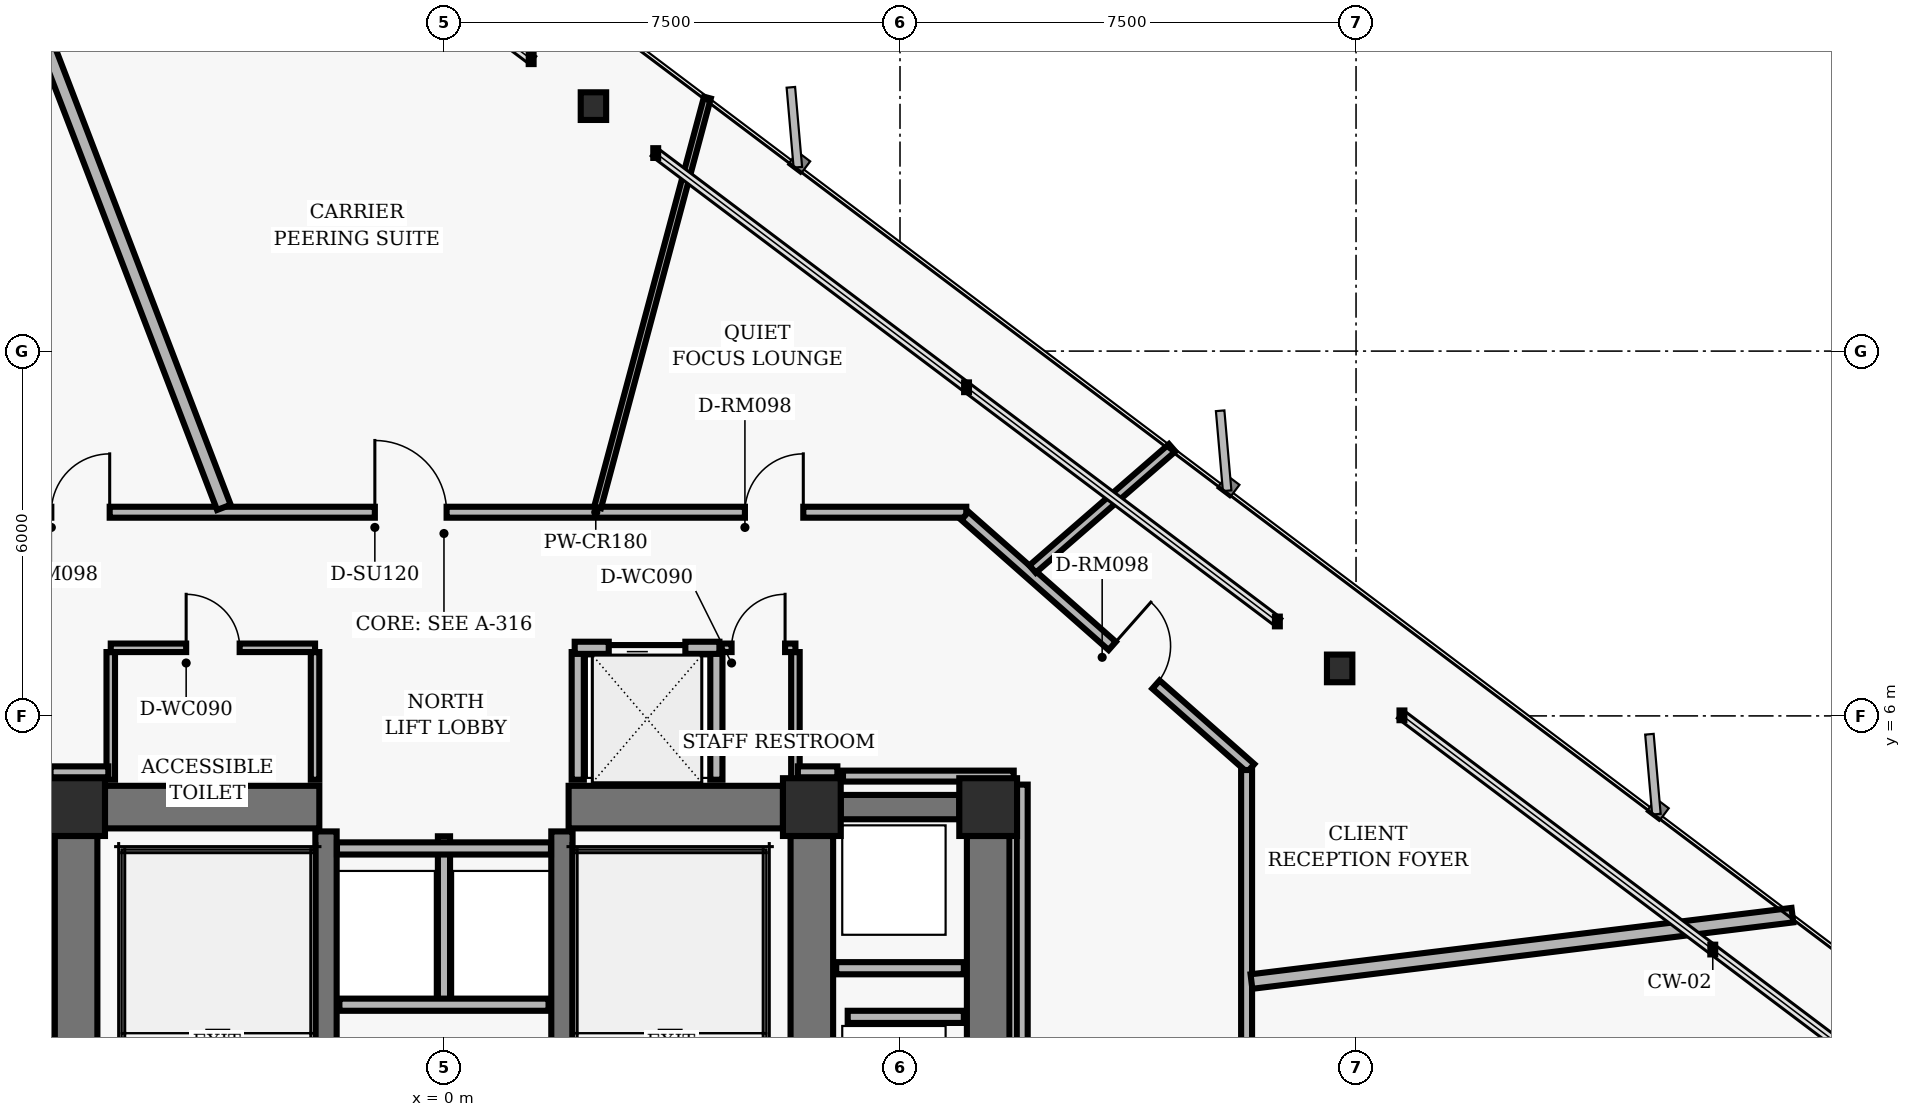
"""IFC4 building model, lengths in metres.
Left out: names, types, materials, properties, quantities, classifications, styles, units other than length and angle.
Written with IfcOpenShell. Run it as: python <this file> out.ifc"""

import sys

from ifc_helpers import new_model, si_unit, direction, frame, frame_2d, origin, origin_2d, place, context, subcontext, project, spatial, rectangle, hollow_rectangle, i_section, extrude, element, fill, save


model = new_model("IFC4")
c1 = context("Model", 3, precision=1e-05, world=origin(), true_north=direction((0.0, 1.0)))
c2 = subcontext(c1, "Body", "Model", "MODEL_VIEW")
j1 = project(units=[si_unit("LENGTHUNIT", "METRE"), si_unit("PLANEANGLEUNIT", "RADIAN")], contexts=[c1])
p1 = place(None, origin())
s1 = spatial("IfcSite", under=j1, at=p1, CompositionType="ELEMENT")
p2 = place(p1, origin())
s2 = spatial("IfcBuilding", under=s1, at=p2, CompositionType="ELEMENT")
p3 = place(p2, frame((0.0, 0.0, 66.4)))
s3 = spatial("IfcBuildingStorey", under=s2, at=p3, CompositionType="ELEMENT", Elevation=66.4)
for number, where, z_axis, x_axis in (
    (1, (-6.05, 4.5, 0.0), (0.0, 0.0, 1.0), (1.0, 0.0, 0.0)),
    (2, (6.05, 4.5, 0.0), (0.0, 0.0, 1.0), (1.0, 0.0, 0.0)),
    (3, (8.95, 4.5, 0.0), (0.0, 0.0, 1.0), (1.0, 0.0, 0.0)),
):
    element("IfcColumn", number, at=place(p3, frame(where, z_axis=z_axis, x_axis=x_axis)), inside=s3, PredefinedType="COLUMN", context=c2, shape_type="SweptSolid", body=[
        extrude(hollow_rectangle(XDim=0.95, YDim=0.95, WallThickness=0.06, InnerFilletRadius=0.02, OuterFilletRadius=0.04, at=origin_2d()), origin(), (0.0, 0.0, 1.0), 3.36),
    ])
for number, where, z_axis, x_axis in (
    (4, (-6.05, 0.475, 0.0), (0.0, 0.0, 1.0), (0.0, 1.0, 0.0)),
    (5, (6.05, 0.475, 0.0), (0.0, 0.0, 1.0), (0.0, 1.0, 0.0)),
):
    element("IfcWall", number, at=place(p3, frame(where, z_axis=z_axis, x_axis=x_axis)), inside=s3, PredefinedType="SHEAR", context=c2, shape_type="SweptSolid", body=[
        extrude(rectangle(XDim=3.55, YDim=0.7, at=frame_2d((1.775, 0.0))), origin(), (0.0, 0.0, 1.0), 3.098),
    ])
for number, where, z_axis, x_axis in (
    (6, (-1.94, -4.1, 0.0), (0.0, 0.0, 1.0), (0.0, 1.0, 0.0)),
    (7, (1.94, -4.1, 0.0), (0.0, 0.0, 1.0), (0.0, 1.0, 0.0)),
):
    element("IfcWall", number, at=place(p3, frame(where, z_axis=z_axis, x_axis=x_axis)), inside=s3, PredefinedType="SHEAR", context=c2, shape_type="SweptSolid", body=[
        extrude(rectangle(XDim=8.2, YDim=0.35, at=frame_2d((4.1, 0.0))), origin(), (0.0, 0.0, 1.0), 3.098),
    ])
for number, where, z_axis, x_axis in (
    (8, (-5.575, 4.5, 0.0), (0.0, 0.0, 1.0), (1.0, 0.0, 0.0)),
    (9, (2.05, 4.5, 0.0), (0.0, 0.0, 1.0), (1.0, 0.0, 0.0)),
):
    element("IfcWall", number, at=place(p3, frame(where, z_axis=z_axis, x_axis=x_axis)), inside=s3, PredefinedType="SHEAR", context=c2, shape_type="SweptSolid", body=[
        extrude(rectangle(XDim=3.525, YDim=0.7, at=frame_2d((1.762, 0.0))), origin(), (0.0, 0.0, 1.0), 3.098),
    ])
p4 = place(p3, frame((8.95, -3.825, 0.0), z_axis=(0.0, 0.0, 1.0), x_axis=(0.0, 1.0, 0.0)))
e10 = element("IfcWall", 10, at=p4, inside=s3, PredefinedType="SHEAR", context=c2, shape_type="SweptSolid", body=[
    extrude(rectangle(XDim=7.85, YDim=0.7, at=frame_2d((3.925, 0.0))), origin(), (0.0, 0.0, 1.0), 3.098),
])
p5 = place(p3, frame((6.525, 4.5, 0.0), z_axis=(0.0, 0.0, 1.0), x_axis=(1.0, 0.0, 0.0)))
e11 = element("IfcWall", 11, at=p5, inside=s3, PredefinedType="SHEAR", context=c2, shape_type="SweptSolid", body=[
    extrude(rectangle(XDim=1.95, YDim=0.4, at=frame_2d((0.975, 0.0))), origin(), (0.0, 0.0, 1.0), 3.098),
])
for number, where, z_axis, x_axis in (
    (12, (14.73, 6.781, 0.0), (0.0, 0.0, 1.0), (1.0, 0.0, 0.0)),
    (13, (2.458, 16.029, 0.0), (0.0, 0.0, 1.0), (1.0, 0.0, 0.0)),
):
    element("IfcColumn", number, at=place(p3, frame(where, z_axis=z_axis, x_axis=x_axis)), inside=s3, PredefinedType="COLUMN", context=c2, shape_type="SweptSolid", body=[
        extrude(i_section(OverallWidth=0.418, OverallDepth=0.455, WebThickness=0.042, FlangeThickness=0.068, FilletRadius=0.025, at=origin_2d()), origin(), (0.0, 0.0, 1.0), 3.36),
    ])
p6 = place(p3, frame((0.0, 1.25, 0.0), z_axis=(0.0, 0.0, 1.0), x_axis=(0.0, 1.0, 0.0)))
e14 = element("IfcWall", 14, at=p6, inside=s3, PredefinedType="PARTITIONING", context=c2, shape_type="SweptSolid", body=[
    extrude(rectangle(XDim=2.77, YDim=0.2, at=frame_2d((1.385, 0.0))), origin(), (0.0, 0.0, 1.0), 3.073),
])
p7 = place(p3, frame((-1.72, 1.25, 0.0), z_axis=(0.0, 0.0, 1.0), x_axis=(1.0, 0.0, 0.0)))
e15 = element("IfcWall", 15, at=p7, inside=s3, PredefinedType="PARTITIONING", context=c2, shape_type="SweptSolid", body=[
    extrude(rectangle(XDim=3.44, YDim=0.2, at=frame_2d((1.72, 0.0))), origin(), (0.0, 0.0, 1.0), 3.073),
])
p8 = place(p3, frame((-1.76, 3.82, 0.0), z_axis=(0.0, 0.0, 1.0), x_axis=(1.0, 0.0, 0.0)))
e16 = element("IfcWall", 16, at=p8, inside=s3, PredefinedType="PARTITIONING", context=c2, shape_type="SweptSolid", body=[
    extrude(rectangle(XDim=3.52, YDim=0.2, at=frame_2d((1.76, 0.0))), origin(), (0.0, 0.0, 1.0), 3.073),
])
for number, where, z_axis, x_axis in (
    (17, (2.2, 4.95, 0.0), (0.0, 0.0, 1.0), (0.0, 1.0, 0.0)),
    (18, (4.48, 4.95, 0.0), (0.0, 0.0, 1.0), (0.0, 1.0, 0.0)),
):
    element("IfcWall", number, at=place(p3, frame(where, z_axis=z_axis, x_axis=x_axis)), inside=s3, PredefinedType="PARTITIONING", context=c2, shape_type="SweptSolid", body=[
        extrude(rectangle(XDim=2.1, YDim=0.2, at=frame_2d((1.05, 0.0))), origin(), (0.0, 0.0, 1.0), 3.073),
    ])
p9 = place(p3, frame((2.15, 7.12, 0.0), z_axis=(0.0, 0.0, 1.0), x_axis=(1.0, 0.0, 0.0)))
e19 = element("IfcWall", 19, at=p9, inside=s3, PredefinedType="PARTITIONING", context=c2, shape_type="SweptSolid", body=[
    extrude(rectangle(XDim=2.38, YDim=0.2, at=frame_2d((1.19, 0.0))), origin(), (0.0, 0.0, 1.0), 2.587),
])
p10 = place(p9, frame((0.56, 0.0, 0.0)))
e20 = element("IfcOpeningElement", 20, at=p10, cuts=e19, PredefinedType="OPENING", context=c2, shape_type="SweptSolid", body=[
    extrude(rectangle(XDim=1.26, YDim=2.06, at=frame_2d((0.63, 1.03))), frame((0.0, 0.11, 0.0), z_axis=(0.0, -1.0, 0.0), x_axis=(1.0, 0.0, 0.0)), (0.0, 0.0, 1.0), 0.22),
])
for number, where, z_axis, x_axis in (
    (21, (-5.48, 4.95, 0.0), (0.0, 0.0, 1.0), (0.0, 1.0, 0.0)),
    (22, (-2.12, 4.95, 0.0), (0.0, 0.0, 1.0), (0.0, 1.0, 0.0)),
):
    element("IfcWall", number, at=place(p3, frame(where, z_axis=z_axis, x_axis=x_axis)), inside=s3, PredefinedType="PARTITIONING", context=c2, shape_type="SweptSolid", body=[
        extrude(rectangle(XDim=2.1, YDim=0.14, at=frame_2d((1.05, 0.0))), origin(), (0.0, 0.0, 1.0), 3.073),
    ])
p11 = place(p3, frame((-5.48, 7.12, 0.0), z_axis=(0.0, 0.0, 1.0), x_axis=(1.0, 0.0, 0.0)))
e23 = element("IfcWall", 23, at=p11, inside=s3, PredefinedType="PARTITIONING", context=c2, shape_type="SweptSolid", body=[
    extrude(rectangle(XDim=3.36, YDim=0.14, at=frame_2d((1.68, 0.0))), origin(), (0.0, 0.0, 1.0), 3.073),
])
p12 = place(p11, frame((1.24, 0.0, 0.0)))
e24 = element("IfcOpeningElement", 24, at=p12, cuts=e23, PredefinedType="OPENING", context=c2, shape_type="SweptSolid", body=[
    extrude(rectangle(XDim=0.88, YDim=2.02, at=frame_2d((0.44, 1.01))), frame((0.0, 0.08, 0.0), z_axis=(0.0, -1.0, 0.0), x_axis=(1.0, 0.0, 0.0)), (0.0, 0.0, 1.0), 0.16),
])
p13 = place(p3, frame((5.78, 4.95, 0.0), z_axis=(0.0, 0.0, 1.0), x_axis=(0.0, 1.0, 0.0)))
e25 = element("IfcWall", 25, at=p13, inside=s3, PredefinedType="PARTITIONING", context=c2, shape_type="SweptSolid", body=[
    extrude(rectangle(XDim=2.1, YDim=0.14, at=frame_2d((1.05, 0.0))), origin(), (0.0, 0.0, 1.0), 3.073),
])
p14 = place(p3, frame((4.56, 7.12, 0.0), z_axis=(0.0, 0.0, 1.0), x_axis=(1.0, 0.0, 0.0)))
e26 = element("IfcWall", 26, at=p14, inside=s3, PredefinedType="PARTITIONING", context=c2, shape_type="SweptSolid", body=[
    extrude(rectangle(XDim=1.22, YDim=0.14, at=frame_2d((0.61, 0.0))), origin(), (0.0, 0.0, 1.0), 2.587),
])
p15 = place(p14, frame((0.17, 0.0, 0.0)))
e27 = element("IfcOpeningElement", 27, at=p15, cuts=e26, PredefinedType="OPENING", context=c2, shape_type="SweptSolid", body=[
    extrude(rectangle(XDim=0.88, YDim=2.02, at=frame_2d((0.44, 1.01))), frame((0.0, 0.08, 0.0), z_axis=(0.0, -1.0, 0.0), x_axis=(1.0, 0.0, 0.0)), (0.0, 0.0, 1.0), 0.16),
])
p16 = place(p3, frame((6.45, 1.85, 0.0), z_axis=(0.0, 0.0, 1.0), x_axis=(1.0, 0.0, 0.0)))
e28 = element("IfcWall", 28, at=p16, inside=s3, PredefinedType="PARTITIONING", context=c2, shape_type="SweptSolid", body=[
    extrude(rectangle(XDim=2.1, YDim=0.2, at=frame_2d((1.05, 0.0))), origin(), (0.0, 0.0, 1.0), 3.073),
])
p17 = place(p3, frame((6.64, 1.05, 0.0), z_axis=(0.0, 0.0, 1.0), x_axis=(1.0, 0.0, 0.0)))
e29 = element("IfcWall", 29, at=p17, inside=s3, PredefinedType="PARTITIONING", context=c2, shape_type="SweptSolid", body=[
    extrude(rectangle(XDim=1.91, YDim=0.2, at=frame_2d((0.955, 0.0))), origin(), (0.0, 0.0, 1.0), 3.073),
])
p18 = place(p3, frame((-8.59, 9.35, 0.0), z_axis=(0.0, 0.0, 1.0), x_axis=(1.0, 0.0, 0.0)))
e30 = element("IfcWall", 30, at=p18, inside=s3, PredefinedType="PARTITIONING", context=c2, shape_type="SweptSolid", body=[
    extrude(rectangle(XDim=17.18, YDim=0.18, at=frame_2d((8.59, 0.0))), origin(), (0.0, 0.0, 1.0), 3.073),
])
p19 = place(p18, frame((13.54, 0.0, 0.0)))
e31 = element("IfcOpeningElement", 31, at=p19, cuts=e30, PredefinedType="OPENING", context=c2, shape_type="SweptSolid", body=[
    extrude(rectangle(XDim=0.96, YDim=2.02, at=frame_2d((0.48, 1.01))), frame((0.0, 0.1, 0.0), z_axis=(0.0, -1.0, 0.0), x_axis=(1.0, 0.0, 0.0)), (0.0, 0.0, 1.0), 0.2),
])
p20 = place(p18, frame((7.453, 0.0, 0.0)))
e32 = element("IfcOpeningElement", 32, at=p20, cuts=e30, PredefinedType="OPENING", context=c2, shape_type="SweptSolid", body=[
    extrude(rectangle(XDim=1.18, YDim=2.02, at=frame_2d((0.59, 1.01))), frame((0.0, 0.1, 0.0), z_axis=(0.0, -1.0, 0.0), x_axis=(1.0, 0.0, 0.0)), (0.0, 0.0, 1.0), 0.2),
])
p21 = place(p18, frame((2.133, 0.0, 0.0)))
e33 = element("IfcOpeningElement", 33, at=p21, cuts=e30, PredefinedType="OPENING", context=c2, shape_type="SweptSolid", body=[
    extrude(rectangle(XDim=0.96, YDim=2.02, at=frame_2d((0.48, 1.01))), frame((0.0, 0.1, 0.0), z_axis=(0.0, -1.0, 0.0), x_axis=(1.0, 0.0, 0.0)), (0.0, 0.0, 1.0), 0.2),
])
p22 = place(p3, frame((8.567, 9.29, 0.0), z_axis=(0.0, 0.0, 1.0), x_axis=(0.749626463267, -0.66186113768, 0.0)))
e34 = element("IfcWall", 34, at=p22, inside=s3, PredefinedType="PARTITIONING", context=c2, shape_type="SweptSolid", body=[
    extrude(rectangle(XDim=6.27, YDim=0.18, at=frame_2d((3.135, 0.0))), origin(), (0.0, 0.0, 1.0), 2.587),
])
p23 = place(p22, frame((3.232, 0.0, 0.0)))
e35 = element("IfcOpeningElement", 35, at=p23, cuts=e34, PredefinedType="OPENING", context=c2, shape_type="SweptSolid", body=[
    extrude(rectangle(XDim=0.96, YDim=2.02, at=frame_2d((0.48, 1.01))), frame((0.0, 0.1, 0.0), z_axis=(0.0, -1.0, 0.0), x_axis=(1.0, 0.0, 0.0)), (0.0, 0.0, 1.0), 0.2),
])
p24 = place(p3, frame((13.2, 5.11, 0.0), z_axis=(0.0, 0.0, 1.0), x_axis=(0.0, -1.0, 0.0)))
e36 = element("IfcWall", 36, at=p24, inside=s3, PredefinedType="PARTITIONING", context=c2, shape_type="SweptSolid", body=[
    extrude(rectangle(XDim=10.22, YDim=0.18, at=frame_2d((5.11, 0.0))), origin(), (0.0, 0.0, 1.0), 3.073),
])
p25 = place(p24, frame((6.21, 0.0, 0.0)))
e37 = element("IfcOpeningElement", 37, at=p25, cuts=e36, PredefinedType="OPENING", context=c2, shape_type="SweptSolid", body=[
    extrude(rectangle(XDim=1.02, YDim=2.02, at=frame_2d((0.51, 1.01))), frame((0.0, 0.1, 0.0), z_axis=(0.0, -1.0, 0.0), x_axis=(1.0, 0.0, 0.0)), (0.0, 0.0, 1.0), 0.2),
])
p26 = place(p3, frame((9.51, -4.87, 0.0), z_axis=(0.0, 0.0, 1.0), x_axis=(0.0, 1.0, 0.0)))
e38 = element("IfcWall", 38, at=p26, inside=s3, PredefinedType="PARTITIONING", context=c2, shape_type="SweptSolid", body=[
    extrude(rectangle(XDim=9.74, YDim=0.18, at=frame_2d((4.87, 0.0))), origin(), (0.0, 0.0, 1.0), 3.073),
])
p27 = place(p3, frame((9.37, 5.01, 0.0), z_axis=(0.0, 0.0, 1.0), x_axis=(-1.0, 0.0, 0.0)))
e39 = element("IfcWall", 39, at=p27, inside=s3, PredefinedType="PARTITIONING", context=c2, shape_type="SweptSolid", body=[
    extrude(rectangle(XDim=2.808, YDim=0.18, at=frame_2d((1.404, 0.0))), origin(), (0.0, 0.0, 1.0), 3.073),
])
p28 = place(p3, frame((6.47, 5.08, 0.0), z_axis=(0.0, 0.0, 1.0), x_axis=(-1.0, 0.0, 0.0)))
e40 = element("IfcWall", 40, at=p28, inside=s3, PredefinedType="PARTITIONING", context=c2, shape_type="SweptSolid", body=[
    extrude(rectangle(XDim=0.65, YDim=0.18, at=frame_2d((0.325, 0.0))), origin(), (0.0, 0.0, 1.0), 3.073),
])
p29 = place(p3, frame((-5.52, 5.08, 0.0), z_axis=(0.0, 0.0, 1.0), x_axis=(-1.0, 0.0, 0.0)))
e41 = element("IfcWall", 41, at=p29, inside=s3, PredefinedType="PARTITIONING", context=c2, shape_type="SweptSolid", body=[
    extrude(rectangle(XDim=0.95, YDim=0.18, at=frame_2d((0.475, 0.0))), origin(), (0.0, 0.0, 1.0), 3.073),
])
p30 = place(p3, frame((13.28, 1.631, 0.0), z_axis=(0.0, 0.0, 1.0), x_axis=(0.992547039209, 0.121862114529, 0.0)))
e42 = element("IfcWall", 42, at=p30, inside=s3, PredefinedType="PARTITIONING", context=c2, shape_type="SweptSolid", body=[
    extrude(rectangle(XDim=8.963, YDim=0.24, at=frame_2d((4.482, 0.0))), origin(), (0.0, 0.0, 1.0), 3.073),
])
p31 = place(p3, frame((9.68, 8.415, 0.0), z_axis=(0.0, 0.0, 1.0), x_axis=(0.754716123846, 0.656051501337, 0.0)))
e43 = element("IfcWall", 43, at=p31, inside=s3, PredefinedType="PARTITIONING", context=c2, shape_type="SweptSolid", body=[
    extrude(rectangle(XDim=3.041, YDim=0.16, at=frame_2d((1.521, 0.0))), origin(), (0.0, 0.0, 1.0), 3.073),
])
p32 = place(p3, frame((2.527, 9.43, 0.0), z_axis=(0.0, 0.0, 1.0), x_axis=(0.258803716415, 0.965929933468, 0.0)))
e44 = element("IfcWall", 44, at=p32, inside=s3, PredefinedType="MOVABLE", context=c2, shape_type="SweptSolid", body=[
    extrude(rectangle(XDim=6.977, YDim=0.115, at=frame_2d((3.489, 0.0))), origin(), (0.0, 0.0, 1.0), 3.073),
])
p33 = place(p3, frame((-3.62, 9.43, 0.0), z_axis=(0.0, 0.0, 1.0), x_axis=(-0.358366182081, 0.933581104961, 0.0)))
e45 = element("IfcWall", 45, at=p33, inside=s3, PredefinedType="PARTITIONING", context=c2, shape_type="SweptSolid", body=[
    extrude(rectangle(XDim=18.901, YDim=0.24, at=frame_2d((9.45, 0.0))), origin(), (0.0, 0.0, 1.0), 3.073),
])
p34 = place(p10, origin())
e46 = element("IfcDoor", 46, at=p34, inside=s3, OperationType="SLIDING_TO_LEFT", PredefinedType="DOOR", context=c2, shape_type="SweptSolid", body=[
    extrude(rectangle(XDim=1.26, YDim=2.06, at=frame_2d((0.63, 1.03))), frame((0.0, 0.025, 0.0), z_axis=(0.0, -1.0, 0.0), x_axis=(1.0, 0.0, 0.0)), (0.0, 0.0, 1.0), 0.05),
])
fill(e20, e46)
p35 = place(p12, origin())
e47 = element("IfcDoor", 47, at=p35, inside=s3, OperationType="SINGLE_SWING_LEFT", PredefinedType="DOOR", context=c2, shape_type="SweptSolid", body=[
    extrude(rectangle(XDim=0.88, YDim=2.02, at=frame_2d((0.44, 1.01))), frame((0.0, 0.025, 0.0), z_axis=(0.0, -1.0, 0.0), x_axis=(1.0, 0.0, 0.0)), (0.0, 0.0, 1.0), 0.05),
])
fill(e24, e47)
p36 = place(p15, origin())
e48 = element("IfcDoor", 48, at=p36, inside=s3, OperationType="SINGLE_SWING_RIGHT", PredefinedType="DOOR", context=c2, shape_type="SweptSolid", body=[
    extrude(rectangle(XDim=0.88, YDim=2.02, at=frame_2d((0.44, 1.01))), frame((0.0, 0.025, 0.0), z_axis=(0.0, -1.0, 0.0), x_axis=(1.0, 0.0, 0.0)), (0.0, 0.0, 1.0), 0.05),
])
fill(e27, e48)
p37 = place(p23, origin())
e49 = element("IfcDoor", 49, at=p37, inside=s3, OperationType="SINGLE_SWING_LEFT", PredefinedType="DOOR", context=c2, shape_type="SweptSolid", body=[
    extrude(rectangle(XDim=0.96, YDim=2.02, at=frame_2d((0.48, 1.01))), frame((0.0, 0.025, 0.0), z_axis=(0.0, -1.0, 0.0), x_axis=(1.0, 0.0, 0.0)), (0.0, 0.0, 1.0), 0.05),
])
fill(e35, e49)
p38 = place(p19, origin())
e50 = element("IfcDoor", 50, at=p38, inside=s3, OperationType="SINGLE_SWING_RIGHT", PredefinedType="DOOR", context=c2, shape_type="SweptSolid", body=[
    extrude(rectangle(XDim=0.96, YDim=2.02, at=frame_2d((0.48, 1.01))), frame((0.0, 0.025, 0.0), z_axis=(0.0, -1.0, 0.0), x_axis=(1.0, 0.0, 0.0)), (0.0, 0.0, 1.0), 0.05),
])
fill(e31, e50)
p39 = place(p20, origin())
e51 = element("IfcDoor", 51, at=p39, inside=s3, OperationType="SINGLE_SWING_LEFT", PredefinedType="DOOR", context=c2, shape_type="SweptSolid", body=[
    extrude(rectangle(XDim=1.18, YDim=2.02, at=frame_2d((0.59, 1.01))), frame((0.0, 0.025, 0.0), z_axis=(0.0, -1.0, 0.0), x_axis=(1.0, 0.0, 0.0)), (0.0, 0.0, 1.0), 0.05),
])
fill(e32, e51)
p40 = place(p21, origin())
e52 = element("IfcDoor", 52, at=p40, inside=s3, OperationType="SINGLE_SWING_RIGHT", PredefinedType="DOOR", context=c2, shape_type="SweptSolid", body=[
    extrude(rectangle(XDim=0.96, YDim=2.02, at=frame_2d((0.48, 1.01))), frame((0.0, 0.025, 0.0), z_axis=(0.0, -1.0, 0.0), x_axis=(1.0, 0.0, 0.0)), (0.0, 0.0, 1.0), 0.05),
])
fill(e33, e52)
save(model, sys.argv[1])
